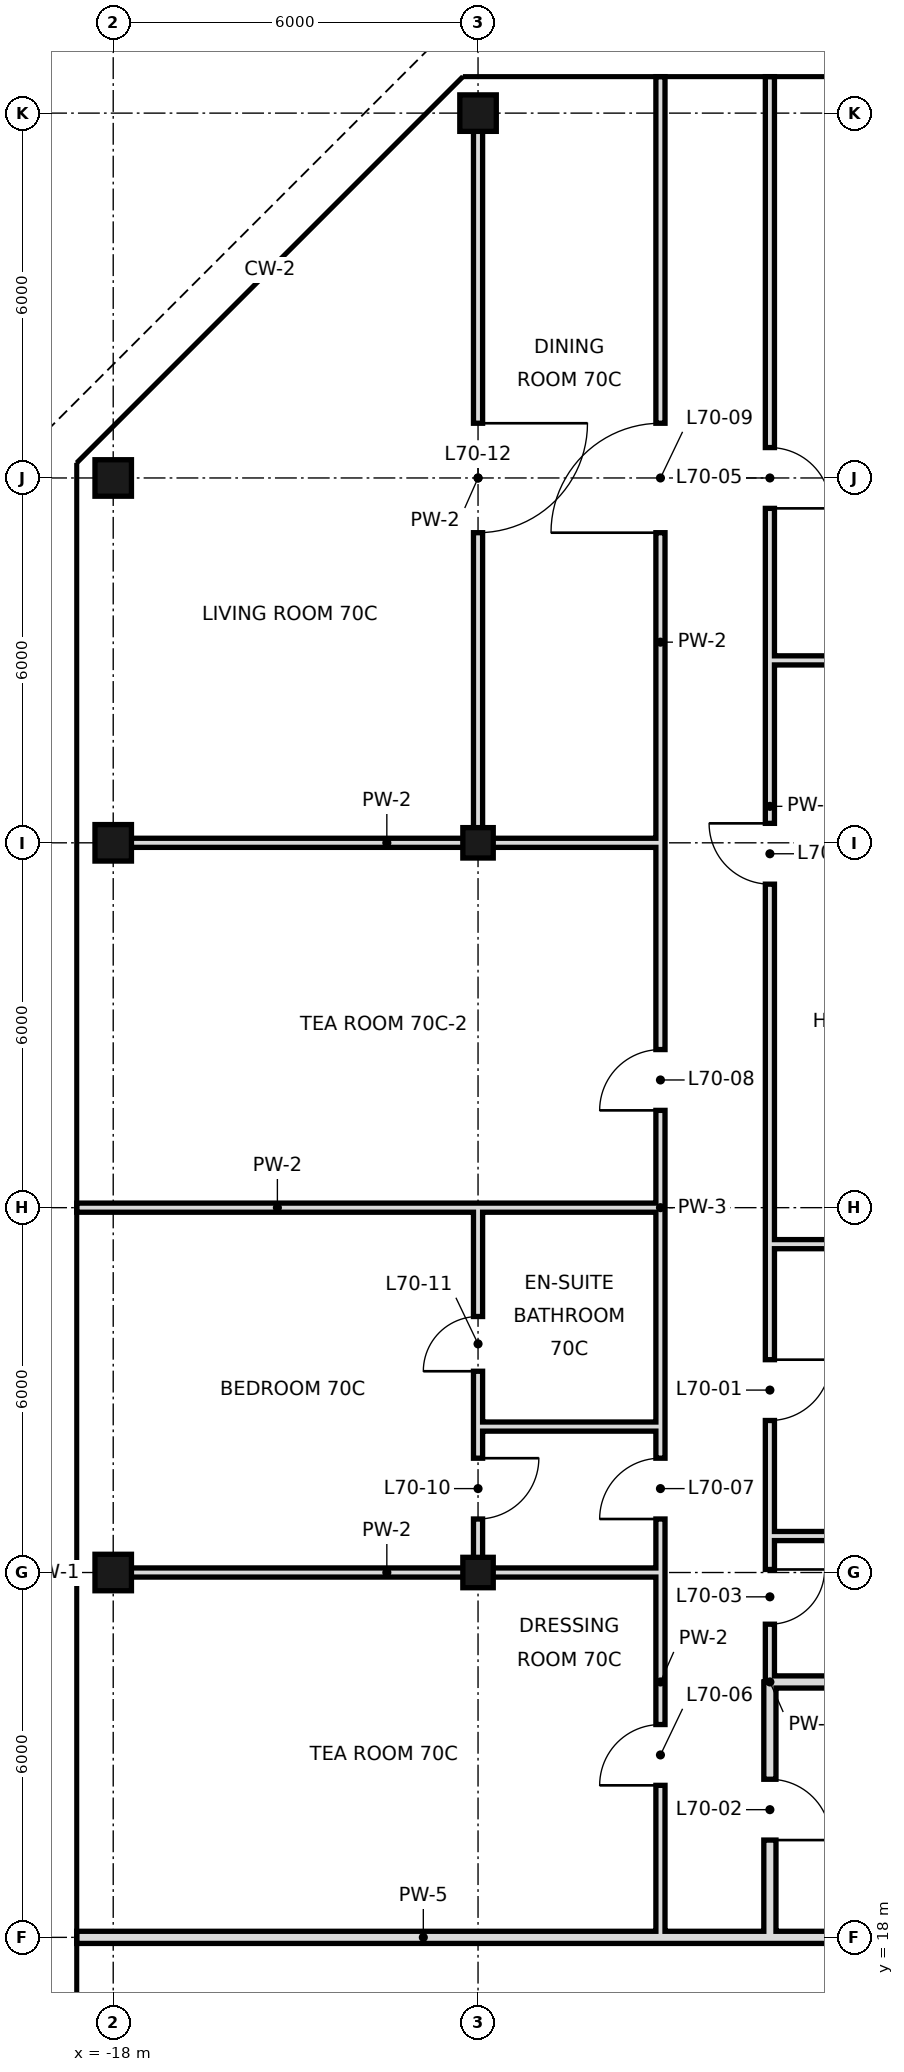
"""IFC4 building model, lengths in metres.
Left out: names, types, materials, properties, quantities, classifications, styles, units other than length and angle.
Written with IfcOpenShell. Run it as: python <this file> out.ifc"""

import sys

from ifc_helpers import new_model, si_unit, direction, frame, frame_2d, origin, origin_2d, place, context, subcontext, project, spatial, rectangle, hollow_rectangle, extrude, element, fill, save


model = new_model("IFC4")
c1 = context("Model", 3, precision=1e-05, world=origin(), true_north=direction((0.0, 1.0)))
c2 = subcontext(c1, "Body", "Model", "MODEL_VIEW")
j1 = project(units=[si_unit("LENGTHUNIT", "METRE"), si_unit("PLANEANGLEUNIT", "RADIAN")], contexts=[c1])
p1 = place(None, origin())
s1 = spatial("IfcSite", under=j1, at=p1, CompositionType="ELEMENT")
p2 = place(p1, origin())
s2 = spatial("IfcBuilding", under=s1, at=p2, CompositionType="ELEMENT")
p3 = place(p2, frame((0.0, 0.0, 298.0)))
s3 = spatial("IfcBuildingStorey", under=s2, at=p3, CompositionType="ELEMENT", Elevation=298.0)
for number, where, z_axis, x_axis in (
    (1, (-18.0, 24.0, 0.0), (0.0, 0.0, 1.0), (1.0, 0.0, 0.0)),
    (2, (-18.0, 36.0, 0.0), (0.0, 0.0, 1.0), (1.0, 0.0, 0.0)),
    (3, (-18.0, 42.0, 0.0), (0.0, 0.0, 1.0), (1.0, 0.0, 0.0)),
):
    element("IfcColumn", number, at=place(p3, frame(where, z_axis=z_axis, x_axis=x_axis)), inside=s3, PredefinedType="COLUMN", context=c2, shape_type="SweptSolid", body=[
        extrude(hollow_rectangle(XDim=0.6, YDim=0.6, WallThickness=0.028, at=origin_2d()), origin(), (0.0, 0.0, 1.0), 3.6),
    ])
for number, where, z_axis, x_axis in (
    (4, (-12.0, 24.0, 0.0), (0.0, 0.0, 1.0), (1.0, 0.0, 0.0)),
    (5, (-12.0, 36.0, 0.0), (0.0, 0.0, 1.0), (1.0, 0.0, 0.0)),
):
    element("IfcColumn", number, at=place(p3, frame(where, z_axis=z_axis, x_axis=x_axis)), inside=s3, PredefinedType="COLUMN", context=c2, shape_type="SweptSolid", body=[
        extrude(hollow_rectangle(XDim=0.5, YDim=0.5, WallThickness=0.025, at=origin_2d()), origin(), (0.0, 0.0, 1.0), 3.6),
    ])
p4 = place(p3, frame((-12.0, 48.0, 0.0), z_axis=(0.0, 0.0, 1.0), x_axis=(1.0, 0.0, 0.0)))
e6 = element("IfcColumn", 6, at=p4, inside=s3, PredefinedType="COLUMN", context=c2, shape_type="SweptSolid", body=[
    extrude(hollow_rectangle(XDim=0.6, YDim=0.6, WallThickness=0.028, at=origin_2d()), origin(), (0.0, 0.0, 1.0), 3.6),
])
p5 = place(p3, frame((-12.0, 24.0, 0.0), z_axis=(0.0, 0.0, 1.0), x_axis=(0.0, 1.0, 0.0)))
e7 = element("IfcWall", 7, at=p5, inside=s3, PredefinedType="PARTITIONING", context=c2, shape_type="SweptSolid", body=[
    extrude(rectangle(XDim=2.4, YDim=0.15, at=frame_2d((1.2, 0.0))), origin(), (0.0, 0.0, 1.0), 2.72),
])
p6 = place(p5, frame((0.88, 0.0, 0.0)))
e8 = element("IfcOpeningElement", 8, at=p6, cuts=e7, PredefinedType="OPENING", context=c2, shape_type="SweptSolid", body=[
    extrude(rectangle(XDim=1.0, YDim=2.4, at=frame_2d((0.5, 1.2))), frame((0.0, 0.085, 0.0), z_axis=(0.0, -1.0, 0.0), x_axis=(1.0, 0.0, 0.0)), (0.0, 0.0, 1.0), 0.17),
])
p7 = place(p3, frame((-12.0, 36.0, 0.0), z_axis=(0.0, 0.0, 1.0), x_axis=(0.0, 1.0, 0.0)))
e9 = element("IfcWall", 9, at=p7, inside=s3, PredefinedType="PARTITIONING", context=c2, shape_type="SweptSolid", body=[
    extrude(rectangle(XDim=12.0, YDim=0.15, at=frame_2d((6.0, 0.0))), origin(), (0.0, 0.0, 1.0), 2.72),
])
p8 = place(p7, frame((5.1, 0.0, 0.0)))
e10 = element("IfcOpeningElement", 10, at=p8, cuts=e9, PredefinedType="OPENING", context=c2, shape_type="SweptSolid", body=[
    extrude(rectangle(XDim=1.8, YDim=2.4, at=frame_2d((0.9, 1.2))), frame((0.0, 0.085, 0.0), z_axis=(0.0, -1.0, 0.0), x_axis=(1.0, 0.0, 0.0)), (0.0, 0.0, 1.0), 0.17),
])
p9 = place(p3, frame((-12.0, 26.4, 0.0), z_axis=(0.0, 0.0, 1.0), x_axis=(0.0, 1.0, 0.0)))
e11 = element("IfcWall", 11, at=p9, inside=s3, PredefinedType="PARTITIONING", context=c2, shape_type="SweptSolid", body=[
    extrude(rectangle(XDim=3.6, YDim=0.15, at=frame_2d((1.8, 0.0))), origin(), (0.0, 0.0, 1.0), 2.72),
])
p10 = place(p9, frame((0.91, 0.0, 0.0)))
e12 = element("IfcOpeningElement", 12, at=p10, cuts=e11, PredefinedType="OPENING", context=c2, shape_type="SweptSolid", body=[
    extrude(rectangle(XDim=0.9, YDim=2.4, at=frame_2d((0.45, 1.2))), frame((0.0, 0.085, 0.0), z_axis=(0.0, -1.0, 0.0), x_axis=(1.0, 0.0, 0.0)), (0.0, 0.0, 1.0), 0.17),
])
p11 = place(p3, frame((-7.2, 18.0, 0.0), z_axis=(0.0, 0.0, 1.0), x_axis=(0.0, 1.0, 0.0)))
e13 = element("IfcWall", 13, at=p11, inside=s3, PredefinedType="SOLIDWALL", context=c2, shape_type="SweptSolid", body=[
    extrude(rectangle(XDim=4.2, YDim=0.2, at=frame_2d((2.1, 0.0))), origin(), (0.0, 0.0, 1.0), 2.72),
])
p12 = place(p11, frame((1.6, 0.0, 0.0)))
e14 = element("IfcOpeningElement", 14, at=p12, cuts=e13, PredefinedType="OPENING", context=c2, shape_type="SweptSolid", body=[
    extrude(rectangle(XDim=1.0, YDim=2.4, at=frame_2d((0.5, 1.2))), frame((0.0, 0.11, 0.0), z_axis=(0.0, -1.0, 0.0), x_axis=(1.0, 0.0, 0.0)), (0.0, 0.0, 1.0), 0.22),
])
p13 = place(p3, frame((-7.2, 24.6, 0.0), z_axis=(0.0, 0.0, 1.0), x_axis=(0.0, 1.0, 0.0)))
e15 = element("IfcWall", 15, at=p13, inside=s3, PredefinedType="PARTITIONING", context=c2, shape_type="SweptSolid", body=[
    extrude(rectangle(XDim=24.0, YDim=0.15, at=frame_2d((12.0, 0.0))), origin(), (0.0, 0.0, 1.0), 3.42),
])
p14 = place(p13, frame((1.9, 0.0, 0.0)))
e16 = element("IfcOpeningElement", 16, at=p14, cuts=e15, PredefinedType="OPENING", context=c2, shape_type="SweptSolid", body=[
    extrude(rectangle(XDim=1.0, YDim=2.4, at=frame_2d((0.5, 1.2))), frame((0.0, 0.085, 0.0), z_axis=(0.0, -1.0, 0.0), x_axis=(1.0, 0.0, 0.0)), (0.0, 0.0, 1.0), 0.17),
])
p15 = place(p13, frame((10.72, 0.0, 0.0)))
e17 = element("IfcOpeningElement", 17, at=p15, cuts=e15, PredefinedType="OPENING", context=c2, shape_type="SweptSolid", body=[
    extrude(rectangle(XDim=1.0, YDim=2.4, at=frame_2d((0.5, 1.2))), frame((0.0, 0.085, 0.0), z_axis=(0.0, -1.0, 0.0), x_axis=(1.0, 0.0, 0.0)), (0.0, 0.0, 1.0), 0.17),
])
p16 = place(p13, frame((16.9, 0.0, 0.0)))
e18 = element("IfcOpeningElement", 18, at=p16, cuts=e15, PredefinedType="OPENING", context=c2, shape_type="SweptSolid", body=[
    extrude(rectangle(XDim=1.0, YDim=2.4, at=frame_2d((0.5, 1.2))), frame((0.0, 0.085, 0.0), z_axis=(0.0, -1.0, 0.0), x_axis=(1.0, 0.0, 0.0)), (0.0, 0.0, 1.0), 0.17),
])
p17 = place(p3, frame((-7.2, 22.2, 0.0), z_axis=(0.0, 0.0, 1.0), x_axis=(0.0, 1.0, 0.0)))
e19 = element("IfcWall", 19, at=p17, inside=s3, PredefinedType="PARTITIONING", context=c2, shape_type="SweptSolid", body=[
    extrude(rectangle(XDim=2.4, YDim=0.15, at=frame_2d((1.2, 0.0))), origin(), (0.0, 0.0, 1.0), 3.42),
])
p18 = place(p17, frame((0.95, 0.0, 0.0)))
e20 = element("IfcOpeningElement", 20, at=p18, cuts=e19, PredefinedType="OPENING", context=c2, shape_type="SweptSolid", body=[
    extrude(rectangle(XDim=0.9, YDim=2.4, at=frame_2d((0.45, 1.2))), frame((0.0, 0.085, 0.0), z_axis=(0.0, -1.0, 0.0), x_axis=(1.0, 0.0, 0.0)), (0.0, 0.0, 1.0), 0.17),
])
p19 = place(p3, frame((-9.0, 18.0, 0.0), z_axis=(0.0, 0.0, 1.0), x_axis=(0.0, 1.0, 0.0)))
e21 = element("IfcWall", 21, at=p19, inside=s3, PredefinedType="PARTITIONING", context=c2, shape_type="SweptSolid", body=[
    extrude(rectangle(XDim=8.4, YDim=0.15, at=frame_2d((4.2, 0.0))), origin(), (0.0, 0.0, 1.0), 3.42),
])
p20 = place(p19, frame((2.5, 0.0, 0.0)))
e22 = element("IfcOpeningElement", 22, at=p20, cuts=e21, PredefinedType="OPENING", context=c2, shape_type="SweptSolid", body=[
    extrude(rectangle(XDim=1.0, YDim=2.4, at=frame_2d((0.5, 1.2))), frame((0.0, 0.085, 0.0), z_axis=(0.0, -1.0, 0.0), x_axis=(1.0, 0.0, 0.0)), (0.0, 0.0, 1.0), 0.17),
])
p21 = place(p19, frame((6.88, 0.0, 0.0)))
e23 = element("IfcOpeningElement", 23, at=p21, cuts=e21, PredefinedType="OPENING", context=c2, shape_type="SweptSolid", body=[
    extrude(rectangle(XDim=1.0, YDim=2.4, at=frame_2d((0.5, 1.2))), frame((0.0, 0.085, 0.0), z_axis=(0.0, -1.0, 0.0), x_axis=(1.0, 0.0, 0.0)), (0.0, 0.0, 1.0), 0.17),
])
p22 = place(p3, frame((-9.0, 30.0, 0.0), z_axis=(0.0, 0.0, 1.0), x_axis=(0.0, 1.0, 0.0)))
e24 = element("IfcWall", 24, at=p22, inside=s3, PredefinedType="PARTITIONING", context=c2, shape_type="SweptSolid", body=[
    extrude(rectangle(XDim=18.6, YDim=0.15, at=frame_2d((9.3, 0.0))), origin(), (0.0, 0.0, 1.0), 3.42),
])
p23 = place(p22, frame((1.6, 0.0, 0.0)))
e25 = element("IfcOpeningElement", 25, at=p23, cuts=e24, PredefinedType="OPENING", context=c2, shape_type="SweptSolid", body=[
    extrude(rectangle(XDim=1.0, YDim=2.4, at=frame_2d((0.5, 1.2))), frame((0.0, 0.085, 0.0), z_axis=(0.0, -1.0, 0.0), x_axis=(1.0, 0.0, 0.0)), (0.0, 0.0, 1.0), 0.17),
])
p24 = place(p22, frame((11.1, 0.0, 0.0)))
e26 = element("IfcOpeningElement", 26, at=p24, cuts=e24, PredefinedType="OPENING", context=c2, shape_type="SweptSolid", body=[
    extrude(rectangle(XDim=1.8, YDim=2.4, at=frame_2d((0.9, 1.2))), frame((0.0, 0.085, 0.0), z_axis=(0.0, -1.0, 0.0), x_axis=(1.0, 0.0, 0.0)), (0.0, 0.0, 1.0), 0.17),
])
p25 = place(p3, frame((-9.0, 26.4, 0.0), z_axis=(0.0, 0.0, 1.0), x_axis=(0.0, 1.0, 0.0)))
e27 = element("IfcWall", 27, at=p25, inside=s3, PredefinedType="PARTITIONING", context=c2, shape_type="SweptSolid", body=[
    extrude(rectangle(XDim=3.6, YDim=0.15, at=frame_2d((1.8, 0.0))), origin(), (0.0, 0.0, 1.0), 3.42),
])
p26 = place(p3, frame((-18.6, 18.0, 0.0), z_axis=(0.0, 0.0, 1.0), x_axis=(1.0, 0.0, 0.0)))
e28 = element("IfcWall", 28, at=p26, inside=s3, PredefinedType="SOLIDWALL", context=c2, shape_type="SweptSolid", body=[
    extrude(rectangle(XDim=11.4, YDim=0.2, at=frame_2d((5.7, 0.0))), origin(), (0.0, 0.0, 1.0), 2.72),
])
p27 = place(p3, frame((-7.2, 18.0, 0.0), z_axis=(0.0, 0.0, 1.0), x_axis=(1.0, 0.0, 0.0)))
e29 = element("IfcWall", 29, at=p27, inside=s3, PredefinedType="SOLIDWALL", context=c2, shape_type="SweptSolid", body=[
    extrude(rectangle(XDim=10.298, YDim=0.2, at=frame_2d((5.149, 0.0))), origin(), (0.0, 0.0, 1.0), 2.72),
])
p28 = place(p3, frame((-7.2, 22.2, 0.0), z_axis=(0.0, 0.0, 1.0), x_axis=(1.0, 0.0, 0.0)))
e30 = element("IfcWall", 30, at=p28, inside=s3, PredefinedType="SOLIDWALL", context=c2, shape_type="SweptSolid", body=[
    extrude(rectangle(XDim=10.3, YDim=0.2, at=frame_2d((5.15, 0.0))), origin(), (0.0, 0.0, 1.0), 2.72),
])
p29 = place(p3, frame((-18.0, 24.0, 0.0), z_axis=(0.0, 0.0, 1.0), x_axis=(1.0, 0.0, 0.0)))
e31 = element("IfcWall", 31, at=p29, inside=s3, PredefinedType="PARTITIONING", context=c2, shape_type="SweptSolid", body=[
    extrude(rectangle(XDim=9.0, YDim=0.15, at=frame_2d((4.5, 0.0))), origin(), (0.0, 0.0, 1.0), 2.72),
])
p30 = place(p3, frame((-7.2, 24.6, 0.0), z_axis=(0.0, 0.0, 1.0), x_axis=(1.0, 0.0, 0.0)))
e32 = element("IfcWall", 32, at=p30, inside=s3, PredefinedType="PARTITIONING", context=c2, shape_type="SweptSolid", body=[
    extrude(rectangle(XDim=10.3, YDim=0.15, at=frame_2d((5.15, 0.0))), origin(), (0.0, 0.0, 1.0), 3.42),
])
p31 = place(p3, frame((-12.0, 26.4, 0.0), z_axis=(0.0, 0.0, 1.0), x_axis=(1.0, 0.0, 0.0)))
e33 = element("IfcWall", 33, at=p31, inside=s3, PredefinedType="PARTITIONING", context=c2, shape_type="SweptSolid", body=[
    extrude(rectangle(XDim=3.0, YDim=0.15, at=frame_2d((1.5, 0.0))), origin(), (0.0, 0.0, 1.0), 3.42),
])
p32 = place(p3, frame((-7.2, 29.4, 0.0), z_axis=(0.0, 0.0, 1.0), x_axis=(1.0, 0.0, 0.0)))
e34 = element("IfcWall", 34, at=p32, inside=s3, PredefinedType="PARTITIONING", context=c2, shape_type="SweptSolid", body=[
    extrude(rectangle(XDim=10.3, YDim=0.15, at=frame_2d((5.15, 0.0))), origin(), (0.0, 0.0, 1.0), 3.42),
])
p33 = place(p3, frame((-18.6, 30.0, 0.0), z_axis=(0.0, 0.0, 1.0), x_axis=(1.0, 0.0, 0.0)))
e35 = element("IfcWall", 35, at=p33, inside=s3, PredefinedType="PARTITIONING", context=c2, shape_type="SweptSolid", body=[
    extrude(rectangle(XDim=6.6, YDim=0.15, at=frame_2d((3.3, 0.0))), origin(), (0.0, 0.0, 1.0), 2.97),
])
p34 = place(p3, frame((-12.0, 30.0, 0.0), z_axis=(0.0, 0.0, 1.0), x_axis=(1.0, 0.0, 0.0)))
e36 = element("IfcWall", 36, at=p34, inside=s3, PredefinedType="PARTITIONING", context=c2, shape_type="SweptSolid", body=[
    extrude(rectangle(XDim=3.0, YDim=0.15, at=frame_2d((1.5, 0.0))), origin(), (0.0, 0.0, 1.0), 2.72),
])
p35 = place(p3, frame((-18.0, 36.0, 0.0), z_axis=(0.0, 0.0, 1.0), x_axis=(1.0, 0.0, 0.0)))
e37 = element("IfcWall", 37, at=p35, inside=s3, PredefinedType="PARTITIONING", context=c2, shape_type="SweptSolid", body=[
    extrude(rectangle(XDim=9.0, YDim=0.15, at=frame_2d((4.5, 0.0))), origin(), (0.0, 0.0, 1.0), 2.72),
])
p36 = place(p3, frame((-7.2, 39.0, 0.0), z_axis=(0.0, 0.0, 1.0), x_axis=(1.0, 0.0, 0.0)))
e38 = element("IfcWall", 38, at=p36, inside=s3, PredefinedType="PARTITIONING", context=c2, shape_type="SweptSolid", body=[
    extrude(rectangle(XDim=10.3, YDim=0.15, at=frame_2d((5.15, 0.0))), origin(), (0.0, 0.0, 1.0), 3.42),
])
p37 = place(p14, origin())
e39 = element("IfcDoor", 39, at=p37, inside=s3, OperationType="SINGLE_SWING_RIGHT", PredefinedType="DOOR", context=c2, shape_type="SweptSolid", body=[
    extrude(rectangle(XDim=1.0, YDim=2.4, at=frame_2d((0.5, 1.2))), frame((0.0, 0.025, 0.0), z_axis=(0.0, -1.0, 0.0), x_axis=(1.0, 0.0, 0.0)), (0.0, 0.0, 1.0), 0.05),
])
fill(e16, e39)
p38 = place(p12, frame((1.0, 0.0, 0.0), z_axis=(0.0, 0.0, 1.0), x_axis=(-1.0, 0.0, 0.0)))
e40 = element("IfcDoor", 40, at=p38, inside=s3, OperationType="SINGLE_SWING_RIGHT", PredefinedType="DOOR", context=c2, shape_type="SweptSolid", body=[
    extrude(rectangle(XDim=1.0, YDim=2.4, at=frame_2d((0.5, 1.2))), frame((0.0, 0.025, 0.0), z_axis=(0.0, -1.0, 0.0), x_axis=(1.0, 0.0, 0.0)), (0.0, 0.0, 1.0), 0.05),
])
fill(e14, e40)
p39 = place(p18, origin())
e41 = element("IfcDoor", 41, at=p39, inside=s3, OperationType="SINGLE_SWING_RIGHT", PredefinedType="DOOR", context=c2, shape_type="SweptSolid", body=[
    extrude(rectangle(XDim=0.9, YDim=2.4, at=frame_2d((0.45, 1.2))), frame((0.0, 0.025, 0.0), z_axis=(0.0, -1.0, 0.0), x_axis=(1.0, 0.0, 0.0)), (0.0, 0.0, 1.0), 0.05),
])
fill(e20, e41)
p40 = place(p15, frame((1.0, 0.0, 0.0), z_axis=(0.0, 0.0, 1.0), x_axis=(-1.0, 0.0, 0.0)))
e42 = element("IfcDoor", 42, at=p40, inside=s3, OperationType="SINGLE_SWING_LEFT", PredefinedType="DOOR", context=c2, shape_type="SweptSolid", body=[
    extrude(rectangle(XDim=1.0, YDim=2.4, at=frame_2d((0.5, 1.2))), frame((0.0, 0.025, 0.0), z_axis=(0.0, -1.0, 0.0), x_axis=(1.0, 0.0, 0.0)), (0.0, 0.0, 1.0), 0.05),
])
fill(e17, e42)
p41 = place(p16, frame((1.0, 0.0, 0.0), z_axis=(0.0, 0.0, 1.0), x_axis=(-1.0, 0.0, 0.0)))
e43 = element("IfcDoor", 43, at=p41, inside=s3, OperationType="SINGLE_SWING_RIGHT", PredefinedType="DOOR", context=c2, shape_type="SweptSolid", body=[
    extrude(rectangle(XDim=1.0, YDim=2.4, at=frame_2d((0.5, 1.2))), frame((0.0, 0.025, 0.0), z_axis=(0.0, -1.0, 0.0), x_axis=(1.0, 0.0, 0.0)), (0.0, 0.0, 1.0), 0.05),
])
fill(e18, e43)
p42 = place(p20, origin())
e44 = element("IfcDoor", 44, at=p42, inside=s3, OperationType="SINGLE_SWING_LEFT", PredefinedType="DOOR", context=c2, shape_type="SweptSolid", body=[
    extrude(rectangle(XDim=1.0, YDim=2.4, at=frame_2d((0.5, 1.2))), frame((0.0, 0.025, 0.0), z_axis=(0.0, -1.0, 0.0), x_axis=(1.0, 0.0, 0.0)), (0.0, 0.0, 1.0), 0.05),
])
fill(e22, e44)
p43 = place(p21, origin())
e45 = element("IfcDoor", 45, at=p43, inside=s3, OperationType="SINGLE_SWING_LEFT", PredefinedType="DOOR", context=c2, shape_type="SweptSolid", body=[
    extrude(rectangle(XDim=1.0, YDim=2.4, at=frame_2d((0.5, 1.2))), frame((0.0, 0.025, 0.0), z_axis=(0.0, -1.0, 0.0), x_axis=(1.0, 0.0, 0.0)), (0.0, 0.0, 1.0), 0.05),
])
fill(e23, e45)
p44 = place(p23, origin())
e46 = element("IfcDoor", 46, at=p44, inside=s3, OperationType="SINGLE_SWING_LEFT", PredefinedType="DOOR", context=c2, shape_type="SweptSolid", body=[
    extrude(rectangle(XDim=1.0, YDim=2.4, at=frame_2d((0.5, 1.2))), frame((0.0, 0.025, 0.0), z_axis=(0.0, -1.0, 0.0), x_axis=(1.0, 0.0, 0.0)), (0.0, 0.0, 1.0), 0.05),
])
fill(e25, e46)
p45 = place(p24, origin())
e47 = element("IfcDoor", 47, at=p45, inside=s3, OperationType="SINGLE_SWING_LEFT", PredefinedType="DOOR", context=c2, shape_type="SweptSolid", body=[
    extrude(rectangle(XDim=1.8, YDim=2.4, at=frame_2d((0.9, 1.2))), frame((0.0, 0.025, 0.0), z_axis=(0.0, -1.0, 0.0), x_axis=(1.0, 0.0, 0.0)), (0.0, 0.0, 1.0), 0.05),
])
fill(e26, e47)
p46 = place(p6, origin())
e48 = element("IfcDoor", 48, at=p46, inside=s3, OperationType="SINGLE_SWING_RIGHT", PredefinedType="DOOR", context=c2, shape_type="SweptSolid", body=[
    extrude(rectangle(XDim=1.0, YDim=2.4, at=frame_2d((0.5, 1.2))), frame((0.0, 0.025, 0.0), z_axis=(0.0, -1.0, 0.0), x_axis=(1.0, 0.0, 0.0)), (0.0, 0.0, 1.0), 0.05),
])
fill(e8, e48)
p47 = place(p10, origin())
e49 = element("IfcDoor", 49, at=p47, inside=s3, OperationType="SINGLE_SWING_LEFT", PredefinedType="DOOR", context=c2, shape_type="SweptSolid", body=[
    extrude(rectangle(XDim=0.9, YDim=2.4, at=frame_2d((0.45, 1.2))), frame((0.0, 0.025, 0.0), z_axis=(0.0, -1.0, 0.0), x_axis=(1.0, 0.0, 0.0)), (0.0, 0.0, 1.0), 0.05),
])
fill(e12, e49)
p48 = place(p8, origin())
e50 = element("IfcDoor", 50, at=p48, inside=s3, OperationType="SINGLE_SWING_RIGHT", PredefinedType="DOOR", context=c2, shape_type="SweptSolid", body=[
    extrude(rectangle(XDim=1.8, YDim=2.4, at=frame_2d((0.9, 1.2))), frame((0.0, 0.025, 0.0), z_axis=(0.0, -1.0, 0.0), x_axis=(1.0, 0.0, 0.0)), (0.0, 0.0, 1.0), 0.05),
])
fill(e10, e50)
save(model, sys.argv[1])
